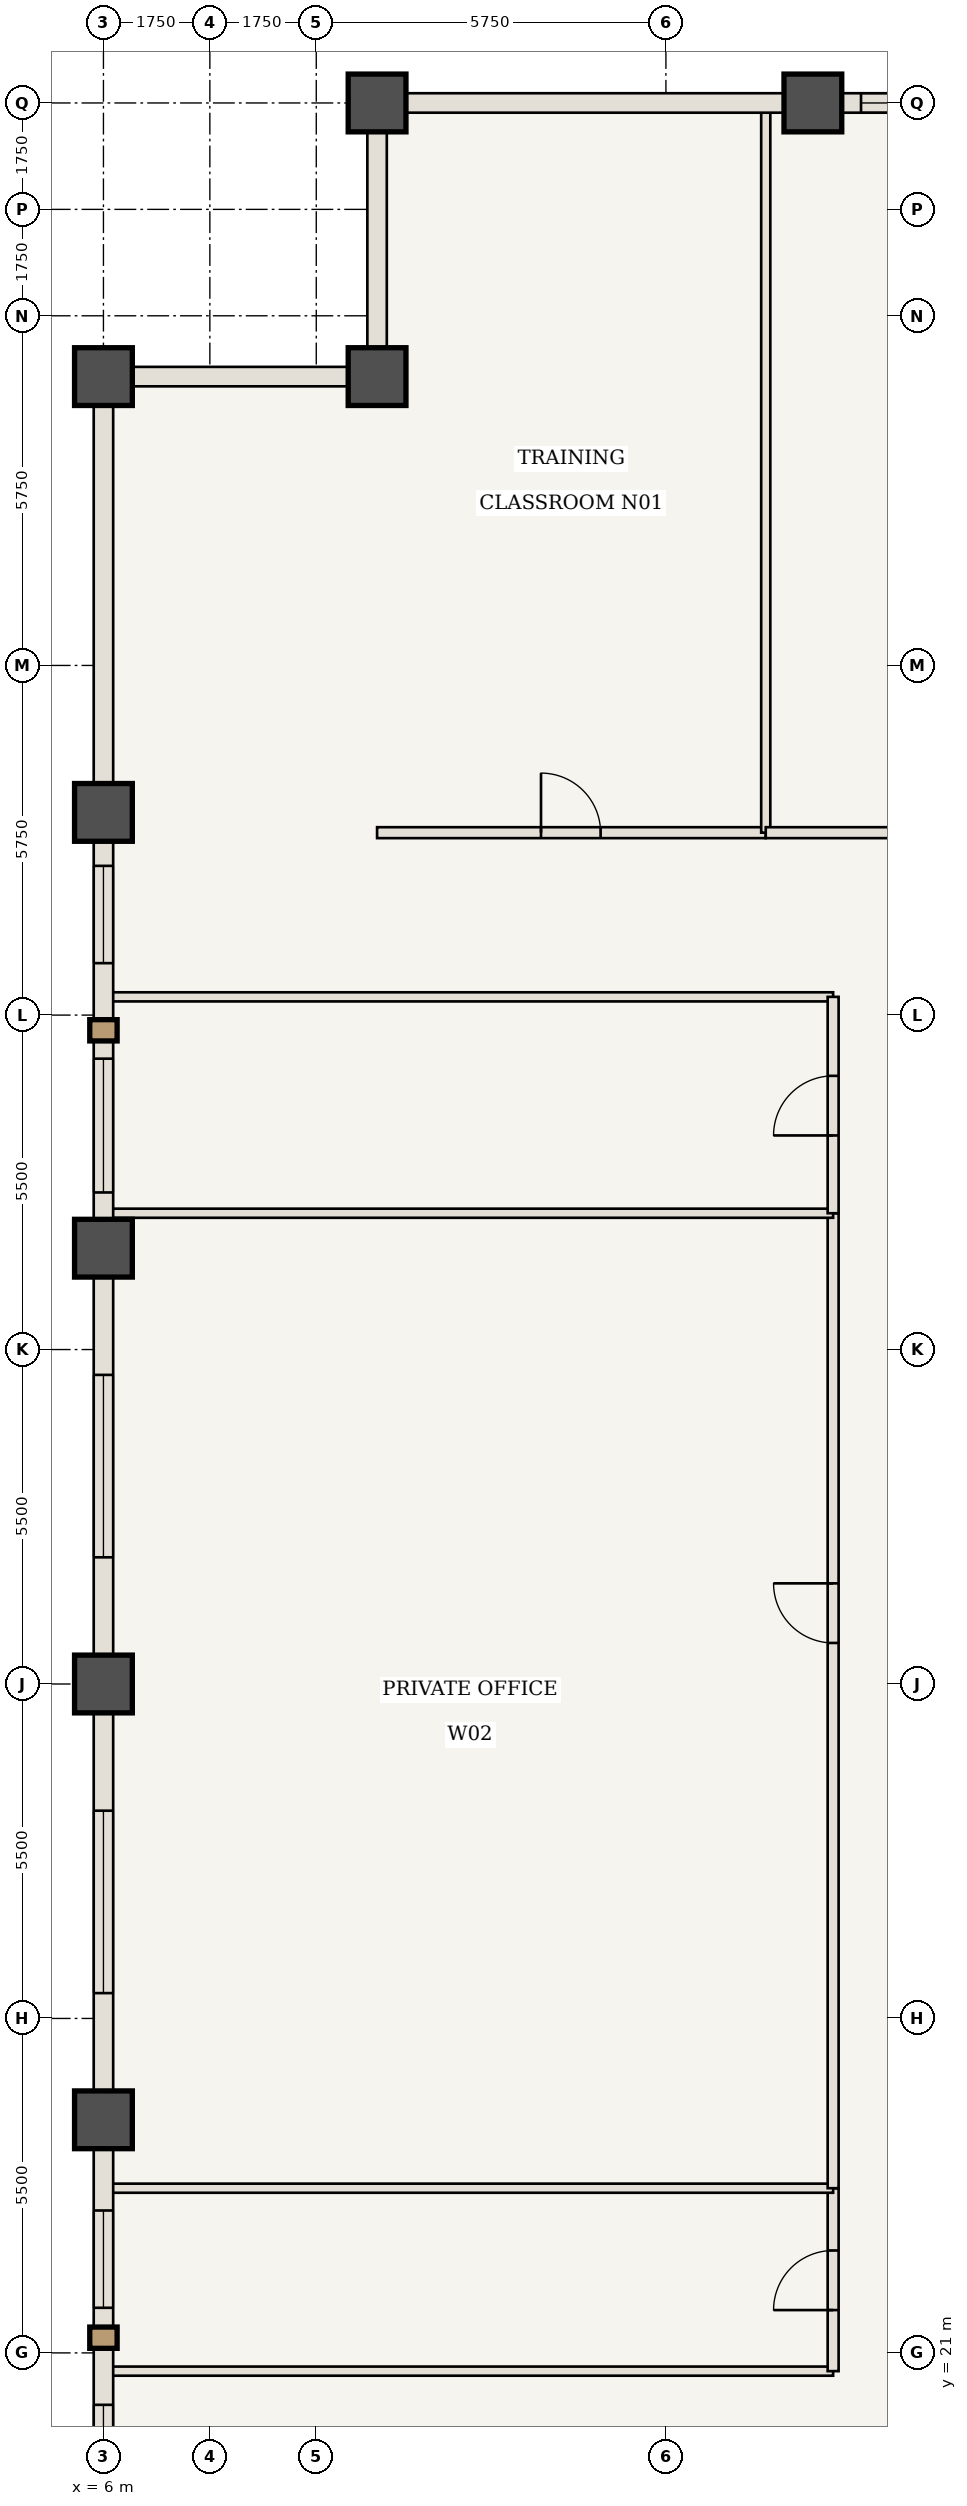
"""IFC4 building model, lengths in metres.
Left out: names, types, materials, properties, quantities, classifications, styles, units other than length and angle.
Written with IfcOpenShell. Run it as: python <this file> out.ifc"""

import sys

from ifc_helpers import new_model, si_unit, direction, frame, frame_2d, origin, origin_2d, place, context, subcontext, project, spatial, rectangle, extrude, element, fill, save


model = new_model("IFC4")
c1 = context("Model", 3, precision=1e-05, world=origin(), true_north=direction((0.0, 1.0)))
c2 = subcontext(c1, "Body", "Model", "MODEL_VIEW")
j1 = project(units=[si_unit("LENGTHUNIT", "METRE"), si_unit("PLANEANGLEUNIT", "RADIAN")], contexts=[c1])
p1 = place(None, origin())
s1 = spatial("IfcSite", under=j1, at=p1, CompositionType="ELEMENT")
p2 = place(p1, origin())
s2 = spatial("IfcBuilding", under=s1, at=p2, CompositionType="ELEMENT")
p3 = place(p2, frame((0.0, 0.0, 122.15)))
s3 = spatial("IfcBuildingStorey", under=s2, at=p3, CompositionType="ELEMENT", Elevation=122.15)
for number, where, z_axis, x_axis in (
    (1, (10.5, 58.0, 0.0), (0.0, 0.0, 1.0), (1.0, 0.0, 0.0)),
    (2, (10.5, 53.5, 0.0), (0.0, 0.0, 1.0), (1.0, 0.0, 0.0)),
    (3, (6.0, 53.5, 0.0), (0.0, 0.0, 1.0), (1.0, 0.0, 0.0)),
    (4, (17.667, 58.0, 0.0), (0.0, 0.0, 1.0), (1.0, 0.0, 0.0)),
    (5, (6.0, 24.833, 0.0), (0.0, 0.0, 1.0), (1.0, 0.0, 0.0)),
    (6, (6.0, 32.0, 0.0), (0.0, 0.0, 1.0), (1.0, 0.0, 0.0)),
    (7, (6.0, 39.167, 0.0), (0.0, 0.0, 1.0), (1.0, 0.0, 0.0)),
    (8, (6.0, 46.333, 0.0), (0.0, 0.0, 1.0), (1.0, 0.0, 0.0)),
):
    element("IfcColumn", number, at=place(p3, frame(where, z_axis=z_axis, x_axis=x_axis)), inside=s3, PredefinedType="COLUMN", context=c2, shape_type="SweptSolid", body=[
        extrude(rectangle(XDim=0.95, YDim=0.95, at=origin_2d()), origin(), (0.0, 0.0, 1.0), 3.85),
    ])
p4 = place(p3, frame((10.5, 46.0, 0.0), z_axis=(0.0, 0.0, 1.0), x_axis=(1.0, 0.0, 0.0)))
e9 = element("IfcWall", 9, at=p4, inside=s3, PredefinedType="STANDARD", context=c2, shape_type="SweptSolid", body=[
    extrude(rectangle(XDim=6.392, YDim=0.18, at=frame_2d((3.196, 0.0))), origin(), (0.0, 0.0, 1.0), 3.685),
])
p5 = place(p4, frame((2.696, 0.0, 0.0)))
e10 = element("IfcOpeningElement", 10, at=p5, cuts=e9, PredefinedType="OPENING", context=c2, shape_type="SweptSolid", body=[
    extrude(rectangle(XDim=0.98, YDim=2.2, at=frame_2d((0.49, 1.1))), frame((0.0, 0.1, 0.0), z_axis=(0.0, -1.0, 0.0), x_axis=(1.0, 0.0, 0.0)), (0.0, 0.0, 1.0), 0.2),
])
p6 = place(p3, frame((16.892, 46.0, 0.0), z_axis=(0.0, 0.0, 1.0), x_axis=(0.0, 1.0, 0.0)))
e11 = element("IfcWall", 11, at=p6, inside=s3, PredefinedType="STANDARD", context=c2, shape_type="SweptSolid", body=[
    extrude(rectangle(XDim=11.94, YDim=0.15, at=frame_2d((5.97, 0.0))), origin(), (0.0, 0.0, 1.0), 3.685),
])
p7 = place(p3, frame((16.892, 46.0, 0.0), z_axis=(0.0, 0.0, 1.0), x_axis=(1.0, 0.0, 0.0)))
e12 = element("IfcWall", 12, at=p7, inside=s3, PredefinedType="STANDARD", context=c2, shape_type="SweptSolid", body=[
    extrude(rectangle(XDim=8.867, YDim=0.18, at=frame_2d((4.433, 0.0))), origin(), (0.0, 0.0, 1.0), 3.685),
])
p8 = place(p7, frame((5.383, 0.0, 0.0)))
e13 = element("IfcOpeningElement", 13, at=p8, cuts=e12, PredefinedType="OPENING", context=c2, shape_type="SweptSolid", body=[
    extrude(rectangle(XDim=0.98, YDim=2.2, at=frame_2d((0.49, 1.1))), frame((0.0, 0.1, 0.0), z_axis=(0.0, -1.0, 0.0), x_axis=(1.0, 0.0, 0.0)), (0.0, 0.0, 1.0), 0.2),
])
for number, where, z_axis, x_axis in (
    (14, (6.06, 20.7, 0.0), (0.0, 0.0, 1.0), (1.0, 0.0, 0.0)),
    (15, (6.06, 43.3, 0.0), (0.0, 0.0, 1.0), (1.0, 0.0, 0.0)),
):
    element("IfcWall", number, at=place(p3, frame(where, z_axis=z_axis, x_axis=x_axis)), inside=s3, PredefinedType="STANDARD", context=c2, shape_type="SweptSolid", body=[
        extrude(rectangle(XDim=11.94, YDim=0.15, at=frame_2d((5.97, 0.0))), origin(), (0.0, 0.0, 1.0), 3.065),
    ])
p9 = place(p3, frame((18.0, 20.7, 0.0), z_axis=(0.0, 0.0, 1.0), x_axis=(0.0, 1.0, 0.0)))
e16 = element("IfcWall", 16, at=p9, inside=s3, PredefinedType="STANDARD", context=c2, shape_type="SweptSolid", body=[
    extrude(rectangle(XDim=3.008, YDim=0.18, at=frame_2d((1.504, 0.0))), origin(), (0.0, 0.0, 1.0), 3.685),
])
p10 = place(p9, frame((1.004, 0.0, 0.0)))
e17 = element("IfcOpeningElement", 17, at=p10, cuts=e16, PredefinedType="OPENING", context=c2, shape_type="SweptSolid", body=[
    extrude(rectangle(XDim=0.98, YDim=2.2, at=frame_2d((0.49, 1.1))), frame((0.0, 0.1, 0.0), z_axis=(0.0, -1.0, 0.0), x_axis=(1.0, 0.0, 0.0)), (0.0, 0.0, 1.0), 0.2),
])
p11 = place(p3, frame((6.06, 23.708, 0.0), z_axis=(0.0, 0.0, 1.0), x_axis=(1.0, 0.0, 0.0)))
e18 = element("IfcWall", 18, at=p11, inside=s3, PredefinedType="STANDARD", context=c2, shape_type="SweptSolid", body=[
    extrude(rectangle(XDim=11.94, YDim=0.15, at=frame_2d((5.97, 0.0))), origin(), (0.0, 0.0, 1.0), 3.685),
])
p12 = place(p3, frame((18.0, 23.708, 0.0), z_axis=(0.0, 0.0, 1.0), x_axis=(0.0, 1.0, 0.0)))
e19 = element("IfcWall", 19, at=p12, inside=s3, PredefinedType="STANDARD", context=c2, shape_type="SweptSolid", body=[
    extrude(rectangle(XDim=16.033, YDim=0.18, at=frame_2d((8.017, 0.0))), origin(), (0.0, 0.0, 1.0), 3.685),
])
p13 = place(p12, frame((8.967, 0.0, 0.0)))
e20 = element("IfcOpeningElement", 20, at=p13, cuts=e19, PredefinedType="OPENING", context=c2, shape_type="SweptSolid", body=[
    extrude(rectangle(XDim=0.98, YDim=2.2, at=frame_2d((0.49, 1.1))), frame((0.0, 0.1, 0.0), z_axis=(0.0, -1.0, 0.0), x_axis=(1.0, 0.0, 0.0)), (0.0, 0.0, 1.0), 0.2),
])
p14 = place(p3, frame((6.06, 39.742, 0.0), z_axis=(0.0, 0.0, 1.0), x_axis=(1.0, 0.0, 0.0)))
e21 = element("IfcWall", 21, at=p14, inside=s3, PredefinedType="STANDARD", context=c2, shape_type="SweptSolid", body=[
    extrude(rectangle(XDim=11.94, YDim=0.15, at=frame_2d((5.97, 0.0))), origin(), (0.0, 0.0, 1.0), 3.685),
])
p15 = place(p3, frame((18.0, 39.742, 0.0), z_axis=(0.0, 0.0, 1.0), x_axis=(0.0, 1.0, 0.0)))
e22 = element("IfcWall", 22, at=p15, inside=s3, PredefinedType="STANDARD", context=c2, shape_type="SweptSolid", body=[
    extrude(rectangle(XDim=3.558, YDim=0.18, at=frame_2d((1.779, 0.0))), origin(), (0.0, 0.0, 1.0), 3.685),
])
p16 = place(p15, frame((1.279, 0.0, 0.0)))
e23 = element("IfcOpeningElement", 23, at=p16, cuts=e22, PredefinedType="OPENING", context=c2, shape_type="SweptSolid", body=[
    extrude(rectangle(XDim=0.98, YDim=2.2, at=frame_2d((0.49, 1.1))), frame((0.0, 0.1, 0.0), z_axis=(0.0, -1.0, 0.0), x_axis=(1.0, 0.0, 0.0)), (0.0, 0.0, 1.0), 0.2),
])
p17 = place(p3, frame((10.5, 58.0, 0.0), z_axis=(0.0, 0.0, 1.0), x_axis=(1.0, 0.0, 0.0)))
e24 = element("IfcWall", 24, at=p17, inside=s3, PredefinedType="USERDEFINED", context=c2, shape_type="SweptSolid", body=[
    extrude(rectangle(XDim=7.167, YDim=0.32, at=frame_2d((3.583, 0.0))), origin(), (0.0, 0.0, 1.0), 2.885),
])
p18 = place(p3, frame((17.667, 58.0, 0.0), z_axis=(0.0, 0.0, 1.0), x_axis=(1.0, 0.0, 0.0)))
e25 = element("IfcWall", 25, at=p18, inside=s3, PredefinedType="USERDEFINED", context=c2, shape_type="SweptSolid", body=[
    extrude(rectangle(XDim=7.167, YDim=0.32, at=frame_2d((3.583, 0.0))), origin(), (0.0, 0.0, 1.0), 2.885),
])
p19 = place(p18, frame((0.792, 0.0, 0.85)))
e26 = element("IfcOpeningElement", 26, at=p19, cuts=e25, PredefinedType="OPENING", context=c2, shape_type="SweptSolid", body=[
    extrude(rectangle(XDim=2.2, YDim=1.835, at=frame_2d((1.1, 0.917))), frame((0.0, 0.17, 0.0), z_axis=(0.0, -1.0, 0.0), x_axis=(1.0, 0.0, 0.0)), (0.0, 0.0, 1.0), 0.34),
])
p20 = place(p18, frame((4.175, 0.0, 0.85)))
e27 = element("IfcOpeningElement", 27, at=p20, cuts=e25, PredefinedType="OPENING", context=c2, shape_type="SweptSolid", body=[
    extrude(rectangle(XDim=2.2, YDim=1.835, at=frame_2d((1.1, 0.917))), frame((0.0, 0.17, 0.0), z_axis=(0.0, -1.0, 0.0), x_axis=(1.0, 0.0, 0.0)), (0.0, 0.0, 1.0), 0.34),
])
p21 = place(p3, frame((6.0, 17.667, 0.0), z_axis=(0.0, 0.0, 1.0), x_axis=(0.0, 1.0, 0.0)))
e28 = element("IfcWall", 28, at=p21, inside=s3, PredefinedType="USERDEFINED", context=c2, shape_type="SweptSolid", body=[
    extrude(rectangle(XDim=7.167, YDim=0.32, at=frame_2d((3.583, 0.0))), origin(), (0.0, 0.0, 1.0), 2.885),
])
p22 = place(p21, frame((0.879, 0.0, 0.85)))
e29 = element("IfcOpeningElement", 29, at=p22, cuts=e28, PredefinedType="OPENING", context=c2, shape_type="SweptSolid", body=[
    extrude(rectangle(XDim=1.6, YDim=1.835, at=frame_2d((0.8, 0.917))), frame((0.0, 0.17, 0.0), z_axis=(0.0, -1.0, 0.0), x_axis=(1.0, 0.0, 0.0)), (0.0, 0.0, 1.0), 0.34),
])
p23 = place(p21, frame((4.075, 0.0, 0.85)))
e30 = element("IfcOpeningElement", 30, at=p23, cuts=e28, PredefinedType="OPENING", context=c2, shape_type="SweptSolid", body=[
    extrude(rectangle(XDim=1.6, YDim=1.835, at=frame_2d((0.8, 0.917))), frame((0.0, 0.17, 0.0), z_axis=(0.0, -1.0, 0.0), x_axis=(1.0, 0.0, 0.0)), (0.0, 0.0, 1.0), 0.34),
])
p24 = place(p3, frame((6.0, 24.833, 0.0), z_axis=(0.0, 0.0, 1.0), x_axis=(0.0, 1.0, 0.0)))
e31 = element("IfcWall", 31, at=p24, inside=s3, PredefinedType="USERDEFINED", context=c2, shape_type="SweptSolid", body=[
    extrude(rectangle(XDim=7.167, YDim=0.32, at=frame_2d((3.583, 0.0))), origin(), (0.0, 0.0, 1.0), 2.885),
])
p25 = place(p24, frame((2.083, 0.0, 0.85)))
e32 = element("IfcOpeningElement", 32, at=p25, cuts=e31, PredefinedType="OPENING", context=c2, shape_type="SweptSolid", body=[
    extrude(rectangle(XDim=3.0, YDim=1.835, at=frame_2d((1.5, 0.917))), frame((0.0, 0.17, 0.0), z_axis=(0.0, -1.0, 0.0), x_axis=(1.0, 0.0, 0.0)), (0.0, 0.0, 1.0), 0.34),
])
p26 = place(p3, frame((6.0, 32.0, 0.0), z_axis=(0.0, 0.0, 1.0), x_axis=(0.0, 1.0, 0.0)))
e33 = element("IfcWall", 33, at=p26, inside=s3, PredefinedType="USERDEFINED", context=c2, shape_type="SweptSolid", body=[
    extrude(rectangle(XDim=7.167, YDim=0.32, at=frame_2d((3.583, 0.0))), origin(), (0.0, 0.0, 1.0), 2.885),
])
p27 = place(p26, frame((2.083, 0.0, 0.85)))
e34 = element("IfcOpeningElement", 34, at=p27, cuts=e33, PredefinedType="OPENING", context=c2, shape_type="SweptSolid", body=[
    extrude(rectangle(XDim=3.0, YDim=1.835, at=frame_2d((1.5, 0.917))), frame((0.0, 0.17, 0.0), z_axis=(0.0, -1.0, 0.0), x_axis=(1.0, 0.0, 0.0)), (0.0, 0.0, 1.0), 0.34),
])
p28 = place(p3, frame((6.0, 39.167, 0.0), z_axis=(0.0, 0.0, 1.0), x_axis=(0.0, 1.0, 0.0)))
e35 = element("IfcWall", 35, at=p28, inside=s3, PredefinedType="USERDEFINED", context=c2, shape_type="SweptSolid", body=[
    extrude(rectangle(XDim=7.167, YDim=0.32, at=frame_2d((3.583, 0.0))), origin(), (0.0, 0.0, 1.0), 2.885),
])
p29 = place(p28, frame((0.917, 0.0, 0.85)))
e36 = element("IfcOpeningElement", 36, at=p29, cuts=e35, PredefinedType="OPENING", context=c2, shape_type="SweptSolid", body=[
    extrude(rectangle(XDim=2.2, YDim=1.835, at=frame_2d((1.1, 0.917))), frame((0.0, 0.17, 0.0), z_axis=(0.0, -1.0, 0.0), x_axis=(1.0, 0.0, 0.0)), (0.0, 0.0, 1.0), 0.34),
])
p30 = place(p28, frame((4.688, 0.0, 0.85)))
e37 = element("IfcOpeningElement", 37, at=p30, cuts=e35, PredefinedType="OPENING", context=c2, shape_type="SweptSolid", body=[
    extrude(rectangle(XDim=1.6, YDim=1.835, at=frame_2d((0.8, 0.917))), frame((0.0, 0.17, 0.0), z_axis=(0.0, -1.0, 0.0), x_axis=(1.0, 0.0, 0.0)), (0.0, 0.0, 1.0), 0.34),
])
p31 = place(p3, frame((6.0, 46.333, 0.0), z_axis=(0.0, 0.0, 1.0), x_axis=(0.0, 1.0, 0.0)))
e38 = element("IfcWall", 38, at=p31, inside=s3, PredefinedType="USERDEFINED", context=c2, shape_type="SweptSolid", body=[
    extrude(rectangle(XDim=7.167, YDim=0.32, at=frame_2d((3.583, 0.0))), origin(), (0.0, 0.0, 1.0), 2.885),
])
for number, where, z_axis, x_axis in (
    (39, (10.5, 53.5, 0.0), (0.0, 0.0, 1.0), (0.0, 1.0, 0.0)),
    (40, (6.0, 53.5, 0.0), (0.0, 0.0, 1.0), (1.0, 0.0, 0.0)),
):
    element("IfcWall", number, at=place(p3, frame(where, z_axis=z_axis, x_axis=x_axis)), inside=s3, PredefinedType="USERDEFINED", context=c2, shape_type="SweptSolid", body=[
        extrude(rectangle(XDim=4.5, YDim=0.32, at=frame_2d((2.25, 0.0))), origin(), (0.0, 0.0, 1.0), 2.885),
    ])
p32 = place(p5, origin())
e41 = element("IfcDoor", 41, at=p32, inside=s3, OperationType="SINGLE_SWING_LEFT", PredefinedType="DOOR", context=c2, shape_type="SweptSolid", body=[
    extrude(rectangle(XDim=0.98, YDim=2.2, at=frame_2d((0.49, 1.1))), frame((0.0, 0.025, 0.0), z_axis=(0.0, -1.0, 0.0), x_axis=(1.0, 0.0, 0.0)), (0.0, 0.0, 1.0), 0.05),
])
fill(e10, e41)
p33 = place(p10, origin())
e42 = element("IfcDoor", 42, at=p33, inside=s3, OperationType="SINGLE_SWING_LEFT", PredefinedType="DOOR", context=c2, shape_type="SweptSolid", body=[
    extrude(rectangle(XDim=0.98, YDim=2.2, at=frame_2d((0.49, 1.1))), frame((0.0, 0.025, 0.0), z_axis=(0.0, -1.0, 0.0), x_axis=(1.0, 0.0, 0.0)), (0.0, 0.0, 1.0), 0.05),
])
fill(e17, e42)
p34 = place(p13, origin())
e43 = element("IfcDoor", 43, at=p34, inside=s3, OperationType="SINGLE_SWING_RIGHT", PredefinedType="DOOR", context=c2, shape_type="SweptSolid", body=[
    extrude(rectangle(XDim=0.98, YDim=2.2, at=frame_2d((0.49, 1.1))), frame((0.0, 0.025, 0.0), z_axis=(0.0, -1.0, 0.0), x_axis=(1.0, 0.0, 0.0)), (0.0, 0.0, 1.0), 0.05),
])
fill(e20, e43)
p35 = place(p16, origin())
e44 = element("IfcDoor", 44, at=p35, inside=s3, OperationType="SINGLE_SWING_LEFT", PredefinedType="DOOR", context=c2, shape_type="SweptSolid", body=[
    extrude(rectangle(XDim=0.98, YDim=2.2, at=frame_2d((0.49, 1.1))), frame((0.0, 0.025, 0.0), z_axis=(0.0, -1.0, 0.0), x_axis=(1.0, 0.0, 0.0)), (0.0, 0.0, 1.0), 0.05),
])
fill(e23, e44)
p36 = place(p19, origin())
e45 = element("IfcWindow", 45, at=p36, inside=s3, PartitioningType="SINGLE_PANEL", PredefinedType="WINDOW", context=c2, shape_type="SweptSolid", body=[
    extrude(rectangle(XDim=2.2, YDim=1.835, at=frame_2d((1.1, 0.917))), frame((0.0, 0.03, 0.0), z_axis=(0.0, -1.0, 0.0), x_axis=(1.0, 0.0, 0.0)), (0.0, 0.0, 1.0), 0.06),
])
fill(e26, e45)
p37 = place(p22, origin())
e46 = element("IfcWindow", 46, at=p37, inside=s3, PartitioningType="SINGLE_PANEL", PredefinedType="WINDOW", context=c2, shape_type="SweptSolid", body=[
    extrude(rectangle(XDim=1.6, YDim=1.835, at=frame_2d((0.8, 0.917))), frame((0.0, 0.03, 0.0), z_axis=(0.0, -1.0, 0.0), x_axis=(1.0, 0.0, 0.0)), (0.0, 0.0, 1.0), 0.06),
])
fill(e29, e46)
p38 = place(p23, origin())
e47 = element("IfcWindow", 47, at=p38, inside=s3, PartitioningType="SINGLE_PANEL", PredefinedType="WINDOW", context=c2, shape_type="SweptSolid", body=[
    extrude(rectangle(XDim=1.6, YDim=1.835, at=frame_2d((0.8, 0.917))), frame((0.0, 0.03, 0.0), z_axis=(0.0, -1.0, 0.0), x_axis=(1.0, 0.0, 0.0)), (0.0, 0.0, 1.0), 0.06),
])
fill(e30, e47)
p39 = place(p25, origin())
e48 = element("IfcWindow", 48, at=p39, inside=s3, PartitioningType="SINGLE_PANEL", PredefinedType="WINDOW", context=c2, shape_type="SweptSolid", body=[
    extrude(rectangle(XDim=3.0, YDim=1.835, at=frame_2d((1.5, 0.917))), frame((0.0, 0.03, 0.0), z_axis=(0.0, -1.0, 0.0), x_axis=(1.0, 0.0, 0.0)), (0.0, 0.0, 1.0), 0.06),
])
fill(e32, e48)
p40 = place(p27, origin())
e49 = element("IfcWindow", 49, at=p40, inside=s3, PartitioningType="SINGLE_PANEL", PredefinedType="WINDOW", context=c2, shape_type="SweptSolid", body=[
    extrude(rectangle(XDim=3.0, YDim=1.835, at=frame_2d((1.5, 0.917))), frame((0.0, 0.03, 0.0), z_axis=(0.0, -1.0, 0.0), x_axis=(1.0, 0.0, 0.0)), (0.0, 0.0, 1.0), 0.06),
])
fill(e34, e49)
p41 = place(p29, origin())
e50 = element("IfcWindow", 50, at=p41, inside=s3, PartitioningType="SINGLE_PANEL", PredefinedType="WINDOW", context=c2, shape_type="SweptSolid", body=[
    extrude(rectangle(XDim=2.2, YDim=1.835, at=frame_2d((1.1, 0.917))), frame((0.0, 0.03, 0.0), z_axis=(0.0, -1.0, 0.0), x_axis=(1.0, 0.0, 0.0)), (0.0, 0.0, 1.0), 0.06),
])
fill(e36, e50)
p42 = place(p30, origin())
e51 = element("IfcWindow", 51, at=p42, inside=s3, PartitioningType="SINGLE_PANEL", PredefinedType="WINDOW", context=c2, shape_type="SweptSolid", body=[
    extrude(rectangle(XDim=1.6, YDim=1.835, at=frame_2d((0.8, 0.917))), frame((0.0, 0.03, 0.0), z_axis=(0.0, -1.0, 0.0), x_axis=(1.0, 0.0, 0.0)), (0.0, 0.0, 1.0), 0.06),
])
fill(e37, e51)
save(model, sys.argv[1])
